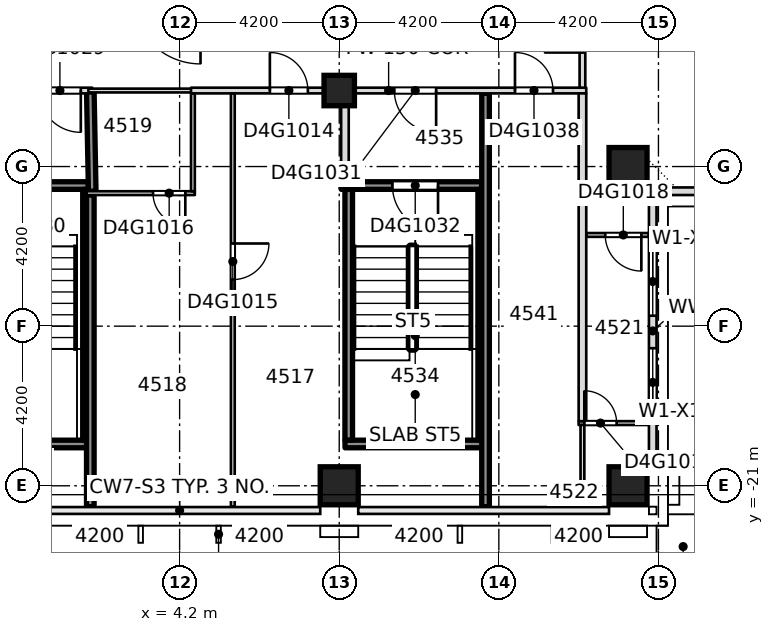
"""IFC4 building model, lengths in metres.
Left out: names, types, materials, properties, quantities, classifications, styles, units other than length and angle.
Written with IfcOpenShell. Run it as: python <this file> out.ifc"""

import sys

from ifc_helpers import new_model, si_unit, direction, frame, frame_2d, origin, origin_2d, place, context, subcontext, project, spatial, rectangle, extrude, element, fill, save


model = new_model("IFC4")
c1 = context("Model", 3, precision=1e-05, world=origin(), true_north=direction((0.0, 1.0)))
c2 = subcontext(c1, "Body", "Model", "MODEL_VIEW")
j1 = project(units=[si_unit("LENGTHUNIT", "METRE"), si_unit("PLANEANGLEUNIT", "RADIAN")], contexts=[c1])
p1 = place(None, origin())
s1 = spatial("IfcSite", under=j1, at=p1, CompositionType="ELEMENT")
p2 = place(p1, origin())
s2 = spatial("IfcBuilding", under=s1, at=p2, CompositionType="ELEMENT")
p3 = place(p2, frame((0.0, 0.0, 175.55)))
s3 = spatial("IfcBuildingStorey", under=s2, at=p3, CompositionType="ELEMENT", Elevation=175.55)
for number, where, z_axis, x_axis in (
    (1, (8.4, -21.0, -0.4), (0.0, 0.0, 1.0), (1.0, 0.0, 0.0)),
    (2, (16.0, -21.0, -0.4), (0.0, 0.0, 1.0), (1.0, 0.0, 0.0)),
    (3, (16.0, -12.6, -0.4), (0.0, 0.0, 1.0), (1.0, 0.0, 0.0)),
):
    element("IfcColumn", number, at=place(p3, frame(where, z_axis=z_axis, x_axis=x_axis)), inside=s3, PredefinedType="COLUMN", context=c2, shape_type="SweptSolid", body=[
        extrude(rectangle(XDim=1.0, YDim=1.0, at=origin_2d()), origin(), (0.0, 0.0, 1.0), 3.45),
    ])
p4 = place(p3, frame((8.4, -10.6, -0.4), z_axis=(0.0, 0.0, 1.0), x_axis=(1.0, 0.0, 0.0)))
e4 = element("IfcColumn", 4, at=p4, inside=s3, PredefinedType="COLUMN", context=c2, shape_type="SweptSolid", body=[
    extrude(rectangle(XDim=0.8, YDim=0.8, at=origin_2d()), origin(), (0.0, 0.0, 1.0), 3.45),
])
p5 = place(p3, frame((-1.848, -19.9, 0.0), z_axis=(0.0, 0.0, 1.0), x_axis=(1.0, 0.0, 0.0)))
e5 = element("IfcWall", 5, at=p5, inside=s3, PredefinedType="SOLIDWALL", context=c2, shape_type="SweptSolid", body=[
    extrude(rectangle(XDim=3.696, YDim=0.2, at=frame_2d((1.848, 0.0))), origin(), (0.0, 0.0, 1.0), 3.05),
])
p6 = place(p3, frame((8.552, -19.9, 0.0), z_axis=(0.0, 0.0, 1.0), x_axis=(1.0, 0.0, 0.0)))
e6 = element("IfcWall", 6, at=p6, inside=s3, PredefinedType="SOLIDWALL", context=c2, shape_type="SweptSolid", body=[
    extrude(rectangle(XDim=3.696, YDim=0.2, at=frame_2d((1.848, 0.0))), origin(), (0.0, 0.0, 1.0), 3.05),
])
p7 = place(p3, frame((14.7, -19.35, 0.0), z_axis=(0.0, 0.0, 1.0), x_axis=(1.0, 0.0, 0.0)))
e7 = element("IfcWall", 7, at=p7, inside=s3, PredefinedType="PARTITIONING", context=c2, shape_type="SweptSolid", body=[
    extrude(rectangle(XDim=1.85, YDim=0.1, at=frame_2d((0.925, 0.0))), origin(), (0.0, 0.0, 1.0), 3.05),
])
p8 = place(p7, frame((0.15, 0.0, 0.0)))
e8 = element("IfcOpeningElement", 8, at=p8, cuts=e7, PredefinedType="OPENING", context=c2, shape_type="SweptSolid", body=[
    extrude(rectangle(XDim=0.85, YDim=2.1, at=frame_2d((0.425, 1.05))), frame((0.0, 0.06, 0.0), z_axis=(0.0, -1.0, 0.0), x_axis=(1.0, 0.0, 0.0)), (0.0, 0.0, 1.0), 0.12),
])
p9 = place(p3, frame((14.9, -14.4, 0.0), z_axis=(0.0, 0.0, 1.0), x_axis=(1.0, 0.0, 0.0)))
e9 = element("IfcWall", 9, at=p9, inside=s3, PredefinedType="PARTITIONING", context=c2, shape_type="SweptSolid", body=[
    extrude(rectangle(XDim=1.65, YDim=0.1, at=frame_2d((0.825, 0.0))), origin(), (0.0, 0.0, 1.0), 3.05),
])
p10 = place(p9, frame((0.5, 0.0, 0.0)))
e10 = element("IfcOpeningElement", 10, at=p10, cuts=e9, PredefinedType="OPENING", context=c2, shape_type="SweptSolid", body=[
    extrude(rectangle(XDim=0.95, YDim=2.1, at=frame_2d((0.475, 1.05))), frame((0.0, 0.06, 0.0), z_axis=(0.0, -1.0, 0.0), x_axis=(1.0, 0.0, 0.0)), (0.0, 0.0, 1.0), 0.12),
])
p11 = place(p3, frame((1.75, -13.3, 0.0), z_axis=(0.0, 0.0, 1.0), x_axis=(1.0, 0.0, 0.0)))
e11 = element("IfcWall", 11, at=p11, inside=s3, PredefinedType="PARTITIONING", context=c2, shape_type="SweptSolid", body=[
    extrude(rectangle(XDim=2.85, YDim=0.1, at=frame_2d((1.425, 0.0))), origin(), (0.0, 0.0, 1.0), 3.05),
])
p12 = place(p11, frame((1.75, 0.0, 0.0)))
e12 = element("IfcOpeningElement", 12, at=p12, cuts=e11, PredefinedType="OPENING", context=c2, shape_type="SweptSolid", body=[
    extrude(rectangle(XDim=0.85, YDim=2.1, at=frame_2d((0.425, 1.05))), frame((0.0, 0.06, 0.0), z_axis=(0.0, -1.0, 0.0), x_axis=(1.0, 0.0, 0.0)), (0.0, 0.0, 1.0), 0.12),
])
p13 = place(p3, frame((-1.948, -13.1, 0.0), z_axis=(0.0, 0.0, 1.0), x_axis=(1.0, 0.0, 0.0)))
e13 = element("IfcWall", 13, at=p13, inside=s3, PredefinedType="SOLIDWALL", context=c2, shape_type="SweptSolid", body=[
    extrude(rectangle(XDim=3.746, YDim=0.2, at=frame_2d((1.873, 0.0))), origin(), (0.0, 0.0, 1.0), 3.05),
])
p14 = place(p13, frame((1.348, 0.0, 0.0)))
e14 = element("IfcOpeningElement", 14, at=p14, cuts=e13, PredefinedType="OPENING", context=c2, shape_type="SweptSolid", body=[
    extrude(rectangle(XDim=1.2, YDim=2.1, at=frame_2d((0.6, 1.05))), frame((0.0, 0.11, 0.0), z_axis=(0.0, -1.0, 0.0), x_axis=(1.0, 0.0, 0.0)), (0.0, 0.0, 1.0), 0.22),
])
p15 = place(p3, frame((8.452, -13.1, 0.0), z_axis=(0.0, 0.0, 1.0), x_axis=(1.0, 0.0, 0.0)))
e15 = element("IfcWall", 15, at=p15, inside=s3, PredefinedType="SOLIDWALL", context=c2, shape_type="SweptSolid", body=[
    extrude(rectangle(XDim=3.696, YDim=0.2, at=frame_2d((1.848, 0.0))), origin(), (0.0, 0.0, 1.0), 3.05),
])
p16 = place(p15, frame((1.348, 0.0, 0.0)))
e16 = element("IfcOpeningElement", 16, at=p16, cuts=e15, PredefinedType="OPENING", context=c2, shape_type="SweptSolid", body=[
    extrude(rectangle(XDim=1.2, YDim=2.1, at=frame_2d((0.6, 1.05))), frame((0.0, 0.11, 0.0), z_axis=(0.0, -1.0, 0.0), x_axis=(1.0, 0.0, 0.0)), (0.0, 0.0, 1.0), 0.22),
])
p17 = place(p3, frame((-5.9, -10.6, 0.0), z_axis=(0.0, 0.0, 1.0), x_axis=(1.0, 0.0, 0.0)))
e17 = element("IfcWall", 17, at=p17, inside=s3, PredefinedType="PARTITIONING", context=c2, shape_type="SweptSolid", body=[
    extrude(rectangle(XDim=7.8, YDim=0.15, at=frame_2d((3.9, 0.0))), origin(), (0.0, 0.0, 1.0), 3.05),
])
p18 = place(p17, frame((1.575, 0.0, 0.0)))
e18 = element("IfcOpeningElement", 18, at=p18, cuts=e17, PredefinedType="OPENING", context=c2, shape_type="SweptSolid", body=[
    extrude(rectangle(XDim=0.95, YDim=2.1, at=frame_2d((0.475, 1.05))), frame((0.0, 0.085, 0.0), z_axis=(0.0, -1.0, 0.0), x_axis=(1.0, 0.0, 0.0)), (0.0, 0.0, 1.0), 0.17),
])
p19 = place(p17, frame((6.4, 0.0, 0.0)))
e19 = element("IfcOpeningElement", 19, at=p19, cuts=e17, PredefinedType="OPENING", context=c2, shape_type="SweptSolid", body=[
    extrude(rectangle(XDim=1.1, YDim=2.1, at=frame_2d((0.55, 1.05))), frame((0.0, 0.085, 0.0), z_axis=(0.0, -1.0, 0.0), x_axis=(1.0, 0.0, 0.0)), (0.0, 0.0, 1.0), 0.17),
])
p20 = place(p3, frame((1.8, -10.6, 0.0), z_axis=(0.0, 0.0, 1.0), x_axis=(1.0, 0.0, 0.0)))
e20 = element("IfcWall", 20, at=p20, inside=s3, PredefinedType="PARTITIONING", context=c2, shape_type="SweptSolid", body=[
    extrude(rectangle(XDim=2.8, YDim=0.1, at=frame_2d((1.4, 0.0))), origin(), (0.0, 0.0, 1.0), 3.05),
])
p21 = place(p3, frame((4.5, -10.6, 0.0), z_axis=(0.0, 0.0, 1.0), x_axis=(1.0, 0.0, 0.0)))
e21 = element("IfcWall", 21, at=p21, inside=s3, PredefinedType="PARTITIONING", context=c2, shape_type="SweptSolid", body=[
    extrude(rectangle(XDim=10.4, YDim=0.15, at=frame_2d((5.2, 0.0))), origin(), (0.0, 0.0, 1.0), 3.05),
])
p22 = place(p21, frame((2.075, 0.0, 0.0)))
e22 = element("IfcOpeningElement", 22, at=p22, cuts=e21, PredefinedType="OPENING", context=c2, shape_type="SweptSolid", body=[
    extrude(rectangle(XDim=1.0, YDim=2.1, at=frame_2d((0.5, 1.05))), frame((0.0, 0.085, 0.0), z_axis=(0.0, -1.0, 0.0), x_axis=(1.0, 0.0, 0.0)), (0.0, 0.0, 1.0), 0.17),
])
p23 = place(p21, frame((5.35, 0.0, 0.0)))
e23 = element("IfcOpeningElement", 23, at=p23, cuts=e21, PredefinedType="OPENING", context=c2, shape_type="SweptSolid", body=[
    extrude(rectangle(XDim=1.1, YDim=2.1, at=frame_2d((0.55, 1.05))), frame((0.0, 0.085, 0.0), z_axis=(0.0, -1.0, 0.0), x_axis=(1.0, 0.0, 0.0)), (0.0, 0.0, 1.0), 0.17),
])
p24 = place(p21, frame((8.525, 0.0, 0.0)))
e24 = element("IfcOpeningElement", 24, at=p24, cuts=e21, PredefinedType="OPENING", context=c2, shape_type="SweptSolid", body=[
    extrude(rectangle(XDim=1.0, YDim=2.1, at=frame_2d((0.5, 1.05))), frame((0.0, 0.085, 0.0), z_axis=(0.0, -1.0, 0.0), x_axis=(1.0, 0.0, 0.0)), (0.0, 0.0, 1.0), 0.17),
])
p25 = place(p3, frame((1.75, -19.798, 0.0), z_axis=(0.0, 0.0, 1.0), x_axis=(0.0, 1.0, 0.0)))
e25 = element("IfcWall", 25, at=p25, inside=s3, PredefinedType="SOLIDWALL", context=c2, shape_type="SweptSolid", body=[
    extrude(rectangle(XDim=6.596, YDim=0.2, at=frame_2d((3.298, 0.0))), origin(), (0.0, 0.0, 1.0), 3.05),
])
p26 = place(p3, frame((1.9, -13.25, 0.0), z_axis=(0.0, 0.0, 1.0), x_axis=(-0.019062755699, 0.999818289163, 0.0)))
e26 = element("IfcWall", 26, at=p26, inside=s3, PredefinedType="SOLIDWALL", context=c2, shape_type="SweptSolid", body=[
    extrude(rectangle(XDim=2.625, YDim=0.2, at=frame_2d((1.313, 0.0))), origin(), (0.0, 0.0, 1.0), 3.05),
])
p27 = place(p3, frame((4.55, -13.25, 0.0), z_axis=(0.0, 0.0, 1.0), x_axis=(0.0, 1.0, 0.0)))
e27 = element("IfcWall", 27, at=p27, inside=s3, PredefinedType="PARTITIONING", context=c2, shape_type="SweptSolid", body=[
    extrude(rectangle(XDim=2.575, YDim=0.1, at=frame_2d((1.288, 0.0))), origin(), (0.0, 0.0, 1.0), 3.05),
])
p28 = place(p3, frame((5.6, -21.55, 0.0), z_axis=(0.0, 0.0, 1.0), x_axis=(0.0, 1.0, 0.0)))
e28 = element("IfcWall", 28, at=p28, inside=s3, PredefinedType="PARTITIONING", context=c2, shape_type="SweptSolid", body=[
    extrude(rectangle(XDim=10.875, YDim=0.1, at=frame_2d((5.438, 0.0))), origin(), (0.0, 0.0, 1.0), 3.05),
])
p29 = place(p28, frame((5.975, 0.0, 0.0)))
e29 = element("IfcOpeningElement", 29, at=p29, cuts=e28, PredefinedType="OPENING", context=c2, shape_type="SweptSolid", body=[
    extrude(rectangle(XDim=0.95, YDim=2.1, at=frame_2d((0.475, 1.05))), frame((0.0, 0.06, 0.0), z_axis=(0.0, -1.0, 0.0), x_axis=(1.0, 0.0, 0.0)), (0.0, 0.0, 1.0), 0.12),
])
p30 = place(p3, frame((8.55, -12.998, 0.0), z_axis=(0.0, 0.0, 1.0), x_axis=(0.0, 1.0, 0.0)))
e30 = element("IfcWall", 30, at=p30, inside=s3, PredefinedType="PARTITIONING", context=c2, shape_type="SweptSolid", body=[
    extrude(rectangle(XDim=2.323, YDim=0.2, at=frame_2d((1.162, 0.0))), origin(), (0.0, 0.0, 1.0), 3.05),
])
for number, where, z_axis, x_axis in (
    (31, (8.65, -19.798, 0.0), (0.0, 0.0, 1.0), (0.0, 1.0, 0.0)),
    (32, (12.15, -19.798, 0.0), (0.0, 0.0, 1.0), (0.0, 1.0, 0.0)),
):
    element("IfcWall", number, at=place(p3, frame(where, z_axis=z_axis, x_axis=x_axis)), inside=s3, PredefinedType="SOLIDWALL", context=c2, shape_type="SweptSolid", body=[
        extrude(rectangle(XDim=6.596, YDim=0.2, at=frame_2d((3.298, 0.0))), origin(), (0.0, 0.0, 1.0), 3.05),
    ])
p31 = place(p3, frame((14.8, -21.55, 0.0), z_axis=(0.0, 0.0, 1.0), x_axis=(0.0, 1.0, 0.0)))
e33 = element("IfcWall", 33, at=p31, inside=s3, PredefinedType="PARTITIONING", context=c2, shape_type="SweptSolid", body=[
    extrude(rectangle(XDim=2.15, YDim=0.1, at=frame_2d((1.075, 0.0))), origin(), (0.0, 0.0, 1.0), 3.05),
])
p32 = place(p3, frame((14.8, -19.3, 0.0), z_axis=(0.0, 0.0, 1.0), x_axis=(0.0, 1.0, 0.0)))
e34 = element("IfcWall", 34, at=p32, inside=s3, PredefinedType="PARTITIONING", context=c2, shape_type="SweptSolid", body=[
    extrude(rectangle(XDim=8.625, YDim=0.2, at=frame_2d((4.312, 0.0))), origin(), (0.0, 0.0, 1.0), 3.05),
])
p33 = place(p3, frame((14.8, -10.525, 0.0), z_axis=(0.0, 0.0, 1.0), x_axis=(0.0, 1.0, 0.0)))
e35 = element("IfcWall", 35, at=p33, inside=s3, PredefinedType="PARTITIONING", context=c2, shape_type="SweptSolid", body=[
    extrude(rectangle(XDim=18.925, YDim=0.15, at=frame_2d((9.462, 0.0))), origin(), (0.0, 0.0, 1.0), 3.05),
])
p34 = place(p33, frame((0.925, 0.0, 0.0)))
e36 = element("IfcOpeningElement", 36, at=p34, cuts=e35, PredefinedType="OPENING", context=c2, shape_type="SweptSolid", body=[
    extrude(rectangle(XDim=1.0, YDim=2.1, at=frame_2d((0.5, 1.05))), frame((0.0, 0.085, 0.0), z_axis=(0.0, -1.0, 0.0), x_axis=(1.0, 0.0, 0.0)), (0.0, 0.0, 1.0), 0.17),
])
p35 = place(p33, frame((15.95, 0.0, 0.0)))
e37 = element("IfcOpeningElement", 37, at=p35, cuts=e35, PredefinedType="OPENING", context=c2, shape_type="SweptSolid", body=[
    extrude(rectangle(XDim=1.0, YDim=2.1, at=frame_2d((0.5, 1.05))), frame((0.0, 0.085, 0.0), z_axis=(0.0, -1.0, 0.0), x_axis=(1.0, 0.0, 0.0)), (0.0, 0.0, 1.0), 0.17),
])
p36 = place(p33, frame((9.975, 0.0, 0.0)))
e38 = element("IfcOpeningElement", 38, at=p36, cuts=e35, PredefinedType="OPENING", context=c2, shape_type="SweptSolid", body=[
    extrude(rectangle(XDim=1.1, YDim=2.1, at=frame_2d((0.55, 1.05))), frame((0.0, 0.085, 0.0), z_axis=(0.0, -1.0, 0.0), x_axis=(1.0, 0.0, 0.0)), (0.0, 0.0, 1.0), 0.17),
])
p37 = place(p33, frame((4.825, 0.0, 0.0)))
e39 = element("IfcOpeningElement", 39, at=p37, cuts=e35, PredefinedType="OPENING", context=c2, shape_type="SweptSolid", body=[
    extrude(rectangle(XDim=1.0, YDim=2.1, at=frame_2d((0.5, 1.05))), frame((0.0, 0.085, 0.0), z_axis=(0.0, -1.0, 0.0), x_axis=(1.0, 0.0, 0.0)), (0.0, 0.0, 1.0), 0.17),
])
p38 = place(p3, frame((16.65, -20.5, 0.0), z_axis=(0.0, 0.0, 1.0), x_axis=(0.0, 1.0, 0.0)))
e40 = element("IfcWall", 40, at=p38, inside=s3, PredefinedType="STANDARD", context=c2, shape_type="SweptSolid", body=[
    extrude(rectangle(XDim=7.15, YDim=0.2, at=frame_2d((3.575, 0.0))), origin(), (0.0, 0.0, 1.0), 3.05),
])
p39 = place(p38, frame((1.32, 0.0, 0.2)))
e41 = element("IfcOpeningElement", 41, at=p39, cuts=e40, PredefinedType="OPENING", context=c2, shape_type="SweptSolid", body=[
    extrude(rectangle(XDim=1.8, YDim=2.65, at=frame_2d((0.9, 1.325))), frame((0.0, 0.11, 0.0), z_axis=(0.0, -1.0, 0.0), x_axis=(1.0, 0.0, 0.0)), (0.0, 0.0, 1.0), 0.22),
])
p40 = place(p38, frame((3.975, 0.0, 0.2)))
e42 = element("IfcOpeningElement", 42, at=p40, cuts=e40, PredefinedType="OPENING", context=c2, shape_type="SweptSolid", body=[
    extrude(rectangle(XDim=1.8, YDim=2.65, at=frame_2d((0.9, 1.325))), frame((0.0, 0.11, 0.0), z_axis=(0.0, -1.0, 0.0), x_axis=(1.0, 0.0, 0.0)), (0.0, 0.0, 1.0), 0.22),
])
p41 = place(p3, frame((16.75, -13.25, 0.0), z_axis=(0.0, 0.0, 1.0), x_axis=(1.0, 0.0, 0.0)))
e43 = element("IfcWall", 43, at=p41, inside=s3, PredefinedType="STANDARD", context=c2, shape_type="SweptSolid", body=[
    extrude(rectangle(XDim=7.95, YDim=0.2, at=frame_2d((3.975, 0.0))), origin(), (0.0, 0.0, 1.0), 3.05),
])
p42 = place(p3, frame((12.25, -21.55, 0.0), z_axis=(0.0, 0.0, 1.0), x_axis=(0.0, 1.0, 0.0)))
e44 = element("IfcWall", 44, at=p42, inside=s3, PredefinedType="SOLIDWALL", context=c2, shape_type="SweptSolid", body=[
    extrude(rectangle(XDim=10.875, YDim=0.2, at=frame_2d((5.438, 0.0))), origin(), (0.0, 0.0, 1.0), 3.05),
])
p43 = place(p3, frame((1.85, -21.55, 0.0), z_axis=(0.0, 0.0, 1.0), x_axis=(0.0, 1.0, 0.0)))
e45 = element("IfcWall", 45, at=p43, inside=s3, PredefinedType="SOLIDWALL", context=c2, shape_type="SweptSolid", body=[
    extrude(rectangle(XDim=8.2, YDim=0.2, at=frame_2d((4.1, 0.0))), origin(), (0.0, 0.0, 1.0), 3.05),
])
p44 = place(p22, origin())
e46 = element("IfcDoor", 46, at=p44, inside=s3, OperationType="SINGLE_SWING_LEFT", PredefinedType="DOOR", context=c2, shape_type="SweptSolid", body=[
    extrude(rectangle(XDim=1.0, YDim=2.1, at=frame_2d((0.5, 1.05))), frame((0.0, 0.025, 0.0), z_axis=(0.0, -1.0, 0.0), x_axis=(1.0, 0.0, 0.0)), (0.0, 0.0, 1.0), 0.05),
])
fill(e22, e46)
p45 = place(p29, origin())
e47 = element("IfcDoor", 47, at=p45, inside=s3, OperationType="SINGLE_SWING_RIGHT", PredefinedType="DOOR", context=c2, shape_type="SweptSolid", body=[
    extrude(rectangle(XDim=0.95, YDim=2.1, at=frame_2d((0.475, 1.05))), frame((0.0, 0.025, 0.0), z_axis=(0.0, -1.0, 0.0), x_axis=(1.0, 0.0, 0.0)), (0.0, 0.0, 1.0), 0.05),
])
fill(e29, e47)
p46 = place(p12, origin())
e48 = element("IfcDoor", 48, at=p46, inside=s3, OperationType="SINGLE_SWING_RIGHT", PredefinedType="DOOR", context=c2, shape_type="SweptSolid", body=[
    extrude(rectangle(XDim=0.85, YDim=2.1, at=frame_2d((0.425, 1.05))), frame((0.0, 0.025, 0.0), z_axis=(0.0, -1.0, 0.0), x_axis=(1.0, 0.0, 0.0)), (0.0, 0.0, 1.0), 0.05),
])
fill(e12, e48)
p47 = place(p10, origin())
e49 = element("IfcDoor", 49, at=p47, inside=s3, OperationType="SINGLE_SWING_RIGHT", PredefinedType="DOOR", context=c2, shape_type="SweptSolid", body=[
    extrude(rectangle(XDim=0.95, YDim=2.1, at=frame_2d((0.475, 1.05))), frame((0.0, 0.025, 0.0), z_axis=(0.0, -1.0, 0.0), x_axis=(1.0, 0.0, 0.0)), (0.0, 0.0, 1.0), 0.05),
])
fill(e10, e49)
p48 = place(p8, origin())
e50 = element("IfcDoor", 50, at=p48, inside=s3, OperationType="SINGLE_SWING_RIGHT", PredefinedType="DOOR", context=c2, shape_type="SweptSolid", body=[
    extrude(rectangle(XDim=0.85, YDim=2.1, at=frame_2d((0.425, 1.05))), frame((0.0, 0.025, 0.0), z_axis=(0.0, -1.0, 0.0), x_axis=(1.0, 0.0, 0.0)), (0.0, 0.0, 1.0), 0.05),
])
fill(e8, e50)
p49 = place(p19, origin())
e51 = element("IfcDoor", 51, at=p49, inside=s3, OperationType="SINGLE_SWING_LEFT", PredefinedType="DOOR", context=c2, shape_type="SweptSolid", body=[
    extrude(rectangle(XDim=1.1, YDim=2.1, at=frame_2d((0.55, 1.05))), frame((0.0, 0.025, 0.0), z_axis=(0.0, -1.0, 0.0), x_axis=(1.0, 0.0, 0.0)), (0.0, 0.0, 1.0), 0.05),
])
fill(e19, e51)
p50 = place(p23, origin())
e52 = element("IfcDoor", 52, at=p50, inside=s3, OperationType="SINGLE_SWING_LEFT", PredefinedType="DOOR", context=c2, shape_type="SweptSolid", body=[
    extrude(rectangle(XDim=1.1, YDim=2.1, at=frame_2d((0.55, 1.05))), frame((0.0, 0.025, 0.0), z_axis=(0.0, -1.0, 0.0), x_axis=(1.0, 0.0, 0.0)), (0.0, 0.0, 1.0), 0.05),
])
fill(e23, e52)
p51 = place(p16, origin())
e53 = element("IfcDoor", 53, at=p51, inside=s3, OperationType="SINGLE_SWING_RIGHT", PredefinedType="DOOR", context=c2, shape_type="SweptSolid", body=[
    extrude(rectangle(XDim=1.2, YDim=2.1, at=frame_2d((0.6, 1.05))), frame((0.0, 0.025, 0.0), z_axis=(0.0, -1.0, 0.0), x_axis=(1.0, 0.0, 0.0)), (0.0, 0.0, 1.0), 0.05),
])
fill(e16, e53)
p52 = place(p24, origin())
e54 = element("IfcDoor", 54, at=p52, inside=s3, OperationType="SINGLE_SWING_LEFT", PredefinedType="DOOR", context=c2, shape_type="SweptSolid", body=[
    extrude(rectangle(XDim=1.0, YDim=2.1, at=frame_2d((0.5, 1.05))), frame((0.0, 0.025, 0.0), z_axis=(0.0, -1.0, 0.0), x_axis=(1.0, 0.0, 0.0)), (0.0, 0.0, 1.0), 0.05),
])
fill(e24, e54)
p53 = place(p39, origin())
e55 = element("IfcWindow", 55, at=p53, inside=s3, PartitioningType="SINGLE_PANEL", PredefinedType="WINDOW", context=c2, shape_type="SweptSolid", body=[
    extrude(rectangle(XDim=1.8, YDim=2.65, at=frame_2d((0.9, 1.325))), frame((0.0, 0.03, 0.0), z_axis=(0.0, -1.0, 0.0), x_axis=(1.0, 0.0, 0.0)), (0.0, 0.0, 1.0), 0.06),
])
fill(e41, e55)
p54 = place(p40, origin())
e56 = element("IfcWindow", 56, at=p54, inside=s3, PartitioningType="SINGLE_PANEL", PredefinedType="WINDOW", context=c2, shape_type="SweptSolid", body=[
    extrude(rectangle(XDim=1.8, YDim=2.65, at=frame_2d((0.9, 1.325))), frame((0.0, 0.03, 0.0), z_axis=(0.0, -1.0, 0.0), x_axis=(1.0, 0.0, 0.0)), (0.0, 0.0, 1.0), 0.06),
])
fill(e42, e56)
save(model, sys.argv[1])
